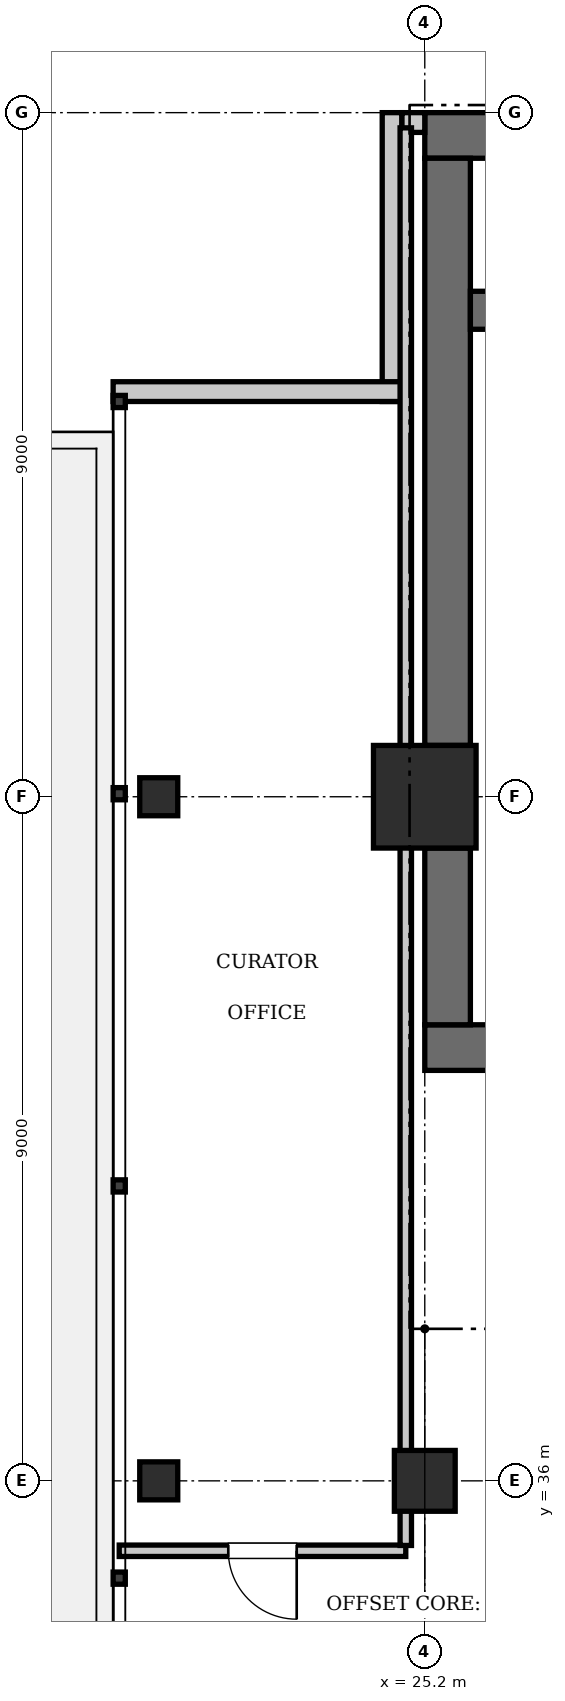
"""IFC4 building model, lengths in metres.
Left out: names, types, materials, properties, quantities, classifications, styles, units other than length and angle.
Written with IfcOpenShell. Run it as: python <this file> out.ifc"""

import sys

from ifc_helpers import new_model, si_unit, direction, frame, frame_2d, origin, origin_2d, place, context, subcontext, project, spatial, rectangle, i_section, extrude, element, fill, save


model = new_model("IFC4")
c1 = context("Model", 3, precision=1e-05, world=origin(), true_north=direction((0.0, 1.0)))
c2 = subcontext(c1, "Body", "Model", "MODEL_VIEW")
j1 = project(units=[si_unit("LENGTHUNIT", "METRE"), si_unit("PLANEANGLEUNIT", "RADIAN")], contexts=[c1])
p1 = place(None, origin())
s1 = spatial("IfcSite", under=j1, at=p1, CompositionType="ELEMENT")
p2 = place(p1, origin())
s2 = spatial("IfcBuilding", under=s1, at=p2, CompositionType="ELEMENT")
p3 = place(p2, frame((0.0, 0.0, 359.1)))
s3 = spatial("IfcBuildingStorey", under=s2, at=p3, CompositionType="ELEMENT", Elevation=359.1)
p4 = place(p3, frame((25.2, 45.0, 0.0), z_axis=(0.0, 0.0, 1.0), x_axis=(1.0, 0.0, 0.0)))
e1 = element("IfcColumn", 1, at=p4, inside=s3, PredefinedType="COLUMN", context=c2, shape_type="SweptSolid", body=[
    extrude(rectangle(XDim=1.35, YDim=1.35, at=origin_2d()), origin(), (0.0, 0.0, 1.0), 5.25),
])
p5 = place(p3, frame((25.2, 53.7, 0.0), z_axis=(0.0, 0.0, 1.0), x_axis=(1.0, 0.0, 0.0)))
e2 = element("IfcWall", 2, at=p5, inside=s3, PredefinedType="SHEAR", context=c2, shape_type="SweptSolid", body=[
    extrude(rectangle(XDim=25.2, YDim=0.6, at=frame_2d((12.6, 0.0))), origin(), (0.0, 0.0, 1.0), 5.25),
])
p6 = place(p3, frame((25.2, 41.7, 0.0), z_axis=(0.0, 0.0, 1.0), x_axis=(1.0, 0.0, 0.0)))
e3 = element("IfcWall", 3, at=p6, inside=s3, PredefinedType="SHEAR", context=c2, shape_type="SweptSolid", body=[
    extrude(rectangle(XDim=6.8, YDim=0.6, at=frame_2d((3.4, 0.0))), origin(), (0.0, 0.0, 1.0), 5.25),
])
p7 = place(p6, frame((1.65, 0.0, 0.0)))
e4 = element("IfcOpeningElement", 4, at=p7, cuts=e3, PredefinedType="OPENING", context=c2, shape_type="SweptSolid", body=[
    extrude(rectangle(XDim=1.15, YDim=2.15, at=frame_2d((0.575, 1.075))), frame((0.0, 0.31, 0.0), z_axis=(0.0, -1.0, 0.0), x_axis=(1.0, 0.0, 0.0)), (0.0, 0.0, 1.0), 0.62),
])
p8 = place(p6, frame((5.15, 0.0, 0.0)))
e5 = element("IfcOpeningElement", 5, at=p8, cuts=e3, PredefinedType="OPENING", context=c2, shape_type="SweptSolid", body=[
    extrude(rectangle(XDim=1.1, YDim=2.2, at=frame_2d((0.55, 1.1))), frame((0.0, 0.31, 0.0), z_axis=(0.0, -1.0, 0.0), x_axis=(1.0, 0.0, 0.0)), (0.0, 0.0, 1.0), 0.62),
])
p9 = place(p3, frame((25.5, 42.0, 0.0), z_axis=(0.0, 0.0, 1.0), x_axis=(0.0, 1.0, 0.0)))
e6 = element("IfcWall", 6, at=p9, inside=s3, PredefinedType="SHEAR", context=c2, shape_type="SweptSolid", body=[
    extrude(rectangle(XDim=2.325, YDim=0.6, at=frame_2d((1.163, 0.0))), origin(), (0.0, 0.0, 1.0), 5.25),
])
p10 = place(p3, frame((25.5, 45.675, 0.0), z_axis=(0.0, 0.0, 1.0), x_axis=(0.0, 1.0, 0.0)))
e7 = element("IfcWall", 7, at=p10, inside=s3, PredefinedType="SHEAR", context=c2, shape_type="SweptSolid", body=[
    extrude(rectangle(XDim=7.725, YDim=0.6, at=frame_2d((3.862, 0.0))), origin(), (0.0, 0.0, 1.0), 5.25),
])
p11 = place(p3, frame((25.8, 51.4, 0.0), z_axis=(0.0, 0.0, 1.0), x_axis=(1.0, 0.0, 0.0)))
e8 = element("IfcWall", 8, at=p11, inside=s3, PredefinedType="SHEAR", context=c2, shape_type="SweptSolid", body=[
    extrude(rectangle(XDim=4.1, YDim=0.5, at=frame_2d((2.05, 0.0))), origin(), (0.0, 0.0, 1.0), 5.25),
])
p12 = place(p3, frame((25.2, 36.0, 0.0), z_axis=(0.0, 0.0, 1.0), x_axis=(1.0, 0.0, 0.0)))
e9 = element("IfcColumn", 9, at=p12, inside=s3, PredefinedType="COLUMN", context=c2, shape_type="SweptSolid", body=[
    extrude(rectangle(XDim=0.8, YDim=0.8, at=origin_2d()), origin(), (0.0, 0.0, 1.0), 5.25),
])
for number, where, z_axis, x_axis in (
    (10, (21.7, 36.0, -0.26), (0.0, 0.0, 1.0), (1.0, 0.0, 0.0)),
    (11, (21.7, 45.0, -0.26), (0.0, 0.0, 1.0), (1.0, 0.0, 0.0)),
):
    element("IfcColumn", number, at=place(p3, frame(where, z_axis=z_axis, x_axis=x_axis)), inside=s3, PredefinedType="COLUMN", context=c2, shape_type="SweptSolid", body=[
        extrude(i_section(OverallWidth=0.5, OverallDepth=0.5, WebThickness=0.022, FlangeThickness=0.032, at=origin_2d()), origin(), (0.0, 0.0, 1.0), 5.51),
    ])
p13 = place(p3, frame((24.77, 50.2, 0.0), z_axis=(0.0, 0.0, 1.0), x_axis=(0.0, 1.0, 0.0)))
e12 = element("IfcWall", 12, at=p13, inside=s3, PredefinedType="SOLIDWALL", context=c2, shape_type="SweptSolid", body=[
    extrude(rectangle(XDim=3.8, YDim=0.26, at=frame_2d((1.9, 0.0))), origin(), (0.0, 0.0, 1.0), 4.97),
])
p14 = place(p3, frame((21.1, 50.33, 0.0), z_axis=(0.0, 0.0, 1.0), x_axis=(1.0, 0.0, 0.0)))
e13 = element("IfcWall", 13, at=p14, inside=s3, PredefinedType="SOLIDWALL", context=c2, shape_type="SweptSolid", body=[
    extrude(rectangle(XDim=3.8, YDim=0.26, at=frame_2d((1.9, 0.0))), origin(), (0.0, 0.0, 1.0), 4.97),
])
p15 = place(p3, frame((25.2, 53.87, 0.0), z_axis=(0.0, 0.0, 1.0), x_axis=(-1.0, 0.0, 0.0)))
e14 = element("IfcWall", 14, at=p15, inside=s3, PredefinedType="SOLIDWALL", context=c2, shape_type="SweptSolid", body=[
    extrude(rectangle(XDim=0.3, YDim=0.26, at=frame_2d((0.15, 0.0))), origin(), (0.0, 0.0, 1.0), 4.97),
])
p16 = place(p3, frame((21.18, 35.08, 0.0), z_axis=(0.0, 0.0, 1.0), x_axis=(1.0, 0.0, 0.0)))
e15 = element("IfcWall", 15, at=p16, inside=s3, PredefinedType="PARTITIONING", context=c2, shape_type="SweptSolid", body=[
    extrude(rectangle(XDim=3.77, YDim=0.15, at=frame_2d((1.885, 0.0))), origin(), (0.0, 0.0, 1.0), 4.97),
])
p17 = place(p16, frame((1.435, 0.0, 0.0)))
e16 = element("IfcOpeningElement", 16, at=p17, cuts=e15, PredefinedType="OPENING", context=c2, shape_type="SweptSolid", body=[
    extrude(rectangle(XDim=0.9, YDim=2.1, at=frame_2d((0.45, 1.05))), frame((0.0, 0.085, 0.0), z_axis=(0.0, -1.0, 0.0), x_axis=(1.0, 0.0, 0.0)), (0.0, 0.0, 1.0), 0.17),
])
p18 = place(p3, frame((24.95, 35.15, 0.0), z_axis=(0.0, 0.0, 1.0), x_axis=(0.0, 1.0, 0.0)))
e17 = element("IfcWall", 17, at=p18, inside=s3, PredefinedType="PARTITIONING", context=c2, shape_type="SweptSolid", body=[
    extrude(rectangle(XDim=18.65, YDim=0.15, at=frame_2d((9.325, 0.0))), origin(), (0.0, 0.0, 1.0), 4.97),
])
p19 = place(p17, frame((0.9, 0.0, 0.0), z_axis=(0.0, 0.0, 1.0), x_axis=(-1.0, 0.0, 0.0)))
e18 = element("IfcDoor", 18, at=p19, inside=s3, OperationType="SINGLE_SWING_LEFT", PredefinedType="DOOR", context=c2, shape_type="SweptSolid", body=[
    extrude(rectangle(XDim=0.9, YDim=2.1, at=frame_2d((0.45, 1.05))), frame((0.0, 0.025, 0.0), z_axis=(0.0, -1.0, 0.0), x_axis=(1.0, 0.0, 0.0)), (0.0, 0.0, 1.0), 0.05),
])
fill(e16, e18)
save(model, sys.argv[1])
